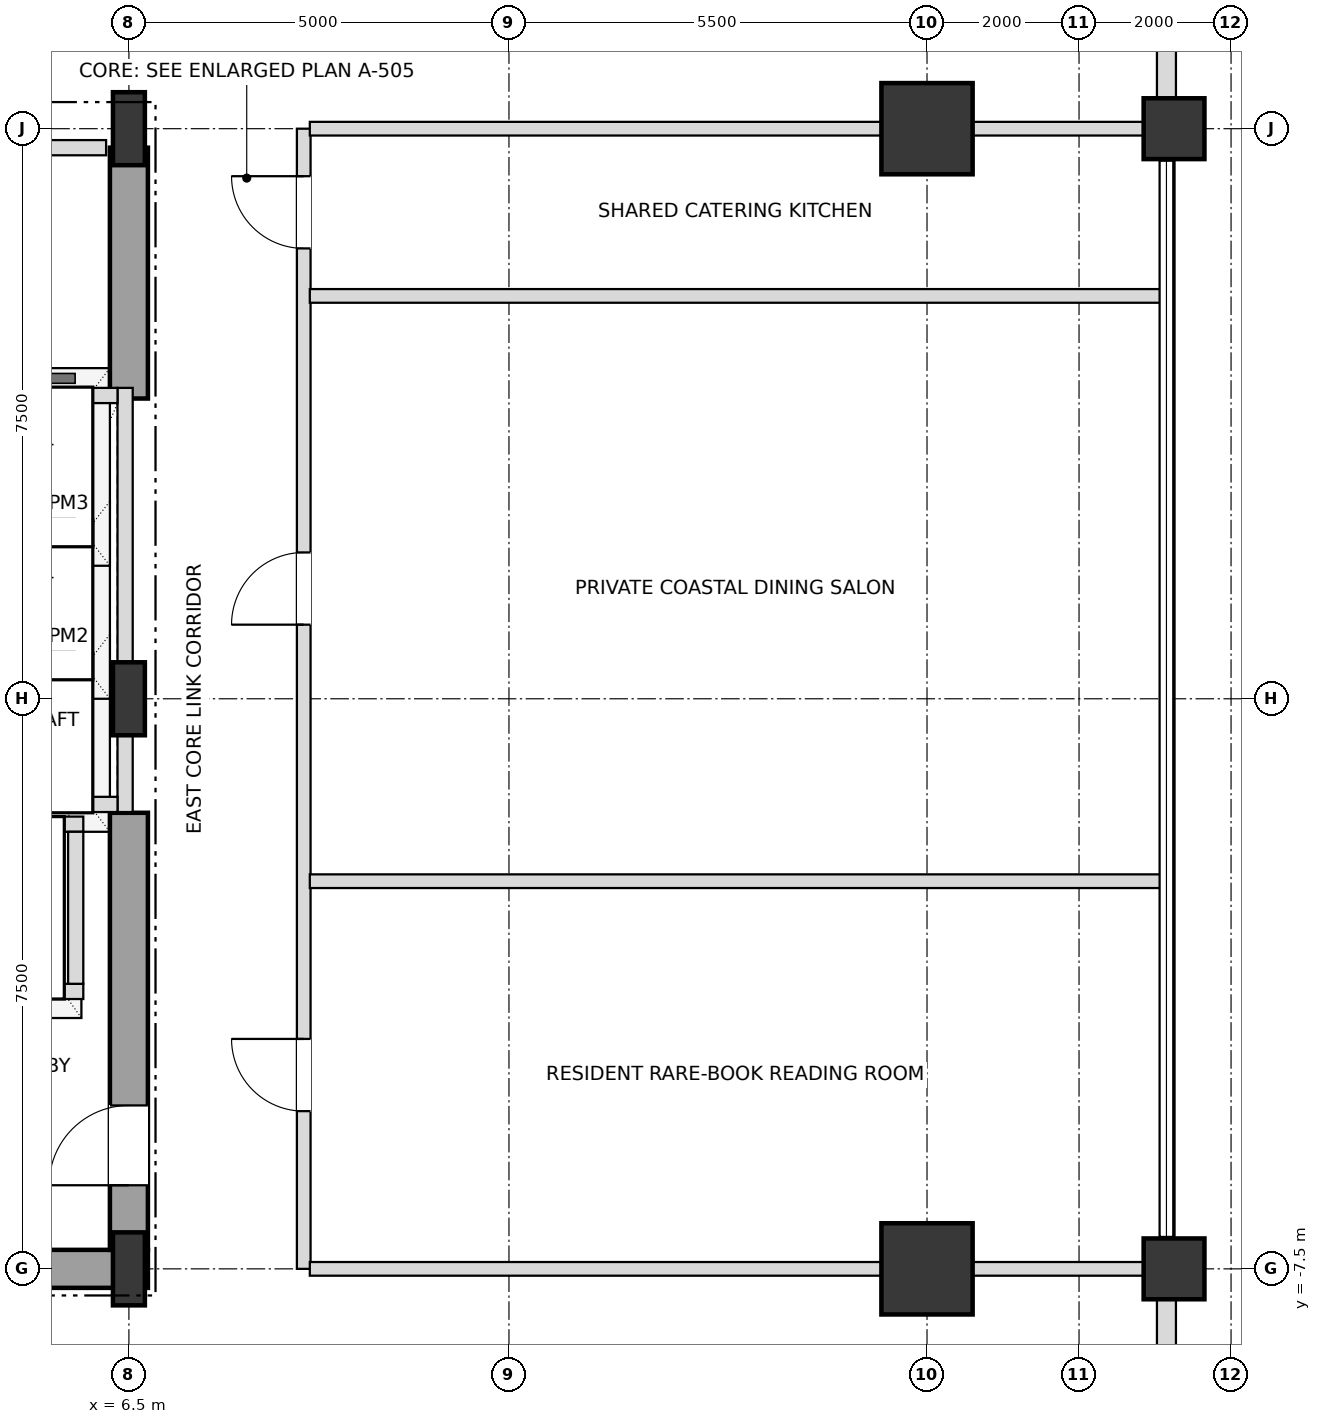
"""IFC4 building model, lengths in metres.
Left out: names, types, materials, properties, quantities, classifications, styles, units other than length and angle.
Written with IfcOpenShell. Run it as: python <this file> out.ifc"""

import sys

from ifc_helpers import new_model, si_unit, direction, frame, frame_2d, origin, origin_2d, place, context, subcontext, project, spatial, rectangle, i_section, extrude, element, fill, save


model = new_model("IFC4")
c1 = context("Model", 3, precision=1e-05, world=origin(), true_north=direction((0.0, 1.0)))
c2 = subcontext(c1, "Body", "Model", "MODEL_VIEW")
j1 = project(units=[si_unit("LENGTHUNIT", "METRE"), si_unit("PLANEANGLEUNIT", "RADIAN")], contexts=[c1])
p1 = place(None, origin())
s1 = spatial("IfcSite", under=j1, at=p1, CompositionType="ELEMENT")
p2 = place(p1, origin())
s2 = spatial("IfcBuilding", under=s1, at=p2, CompositionType="ELEMENT")
p3 = place(p2, frame((0.0, 0.0, 140.4)))
s3 = spatial("IfcBuildingStorey", under=s2, at=p3, CompositionType="ELEMENT", Elevation=140.4)
for number, where, z_axis, x_axis in (
    (1, (6.5, -7.5, 0.0), (0.0, 0.0, 1.0), (1.0, 0.0, 0.0)),
    (2, (6.5, 0.0, 0.0), (0.0, 0.0, 1.0), (1.0, 0.0, 0.0)),
    (3, (6.5, 7.5, 0.0), (0.0, 0.0, 1.0), (1.0, 0.0, 0.0)),
):
    element("IfcColumn", number, at=place(p3, frame(where, z_axis=z_axis, x_axis=x_axis)), inside=s3, PredefinedType="COLUMN", context=c2, shape_type="SweptSolid", body=[
        extrude(i_section(OverallWidth=0.42, OverallDepth=0.96, WebThickness=0.022, FlangeThickness=0.034, at=origin_2d()), origin(), (0.0, 0.0, 1.0), 3.6),
    ])
for number, where, z_axis, x_axis in (
    (4, (17.0, -7.5, 0.0), (0.0, 0.0, 1.0), (1.0, 0.0, 0.0)),
    (5, (17.0, 7.5, 0.0), (0.0, 0.0, 1.0), (1.0, 0.0, 0.0)),
):
    element("IfcColumn", number, at=place(p3, frame(where, z_axis=z_axis, x_axis=x_axis)), inside=s3, PredefinedType="USERDEFINED", context=c2, shape_type="SweptSolid", body=[
        extrude(rectangle(XDim=1.2, YDim=1.2, at=origin_2d()), origin(), (0.0, 0.0, 1.0), 3.6),
    ])
for number, where, z_axis, x_axis in (
    (6, (20.25, -7.5, 0.0), (0.0, 0.0, 1.0), (1.0, 0.0, 0.0)),
    (7, (20.25, 7.5, 0.0), (0.0, 0.0, 1.0), (1.0, 0.0, 0.0)),
):
    element("IfcColumn", number, at=place(p3, frame(where, z_axis=z_axis, x_axis=x_axis)), inside=s3, PredefinedType="COLUMN", context=c2, shape_type="SweptSolid", body=[
        extrude(rectangle(XDim=0.8, YDim=0.8, at=origin_2d()), origin(), (0.0, 0.0, 1.0), 3.6),
    ])
p4 = place(p3, frame((20.15, -12.605, 0.0), z_axis=(0.0, 0.0, 1.0), x_axis=(0.0, 1.0, 0.0)))
e8 = element("IfcWall", 8, at=p4, inside=s3, PredefinedType="SOLIDWALL", context=c2, shape_type="SweptSolid", body=[
    extrude(rectangle(XDim=4.71, YDim=0.25, at=frame_2d((2.355, 0.0))), origin(), (0.0, 0.0, 1.0), 2.736),
])
p5 = place(p4, frame((1.455, 0.0, 0.72)))
e9 = element("IfcOpeningElement", 9, at=p5, cuts=e8, PredefinedType="OPENING", context=c2, shape_type="SweptSolid", body=[
    extrude(rectangle(XDim=1.8, YDim=1.68, at=frame_2d((0.9, 0.84))), frame((0.0, 0.135, 0.0), z_axis=(0.0, -1.0, 0.0), x_axis=(1.0, 0.0, 0.0)), (0.0, 0.0, 1.0), 0.27),
])
p6 = place(p3, frame((20.15, 7.895, 0.0), z_axis=(0.0, 0.0, 1.0), x_axis=(0.0, 1.0, 0.0)))
e10 = element("IfcWall", 10, at=p6, inside=s3, PredefinedType="SOLIDWALL", context=c2, shape_type="SweptSolid", body=[
    extrude(rectangle(XDim=4.71, YDim=0.25, at=frame_2d((2.355, 0.0))), origin(), (0.0, 0.0, 1.0), 2.736),
])
p7 = place(p6, frame((1.455, 0.0, 0.72)))
e11 = element("IfcOpeningElement", 11, at=p7, cuts=e10, PredefinedType="OPENING", context=c2, shape_type="SweptSolid", body=[
    extrude(rectangle(XDim=1.8, YDim=1.68, at=frame_2d((0.9, 0.84))), frame((0.0, 0.135, 0.0), z_axis=(0.0, -1.0, 0.0), x_axis=(1.0, 0.0, 0.0)), (0.0, 0.0, 1.0), 0.27),
])
p8 = place(p3, frame((0.0, -7.5, 0.0), z_axis=(0.0, 0.0, 1.0), x_axis=(1.0, 0.0, 0.0)))
e12 = element("IfcWall", 12, at=p8, inside=s3, PredefinedType="SHEAR", context=c2, shape_type="SweptSolid", body=[
    extrude(rectangle(XDim=6.75, YDim=0.5, at=frame_2d((3.375, 0.0))), origin(), (0.0, 0.0, 1.0), 3.38),
])
p9 = place(p3, frame((6.5, -7.25, 0.0), z_axis=(0.0, 0.0, 1.0), x_axis=(0.0, 1.0, 0.0)))
e13 = element("IfcWall", 13, at=p9, inside=s3, PredefinedType="SHEAR", context=c2, shape_type="SweptSolid", body=[
    extrude(rectangle(XDim=5.75, YDim=0.5, at=frame_2d((2.875, 0.0))), origin(), (0.0, 0.0, 1.0), 3.38),
])
p10 = place(p9, frame((0.85, 0.0, 0.0)))
e14 = element("IfcOpeningElement", 14, at=p10, cuts=e13, PredefinedType="OPENING", context=c2, shape_type="SweptSolid", body=[
    extrude(rectangle(XDim=1.05, YDim=2.15, at=frame_2d((0.525, 1.075))), frame((0.0, 0.26, 0.0), z_axis=(0.0, -1.0, 0.0), x_axis=(1.0, 0.0, 0.0)), (0.0, 0.0, 1.0), 0.52),
])
p11 = place(p3, frame((6.5, 3.95, 0.0), z_axis=(0.0, 0.0, 1.0), x_axis=(0.0, 1.0, 0.0)))
e15 = element("IfcWall", 15, at=p11, inside=s3, PredefinedType="SHEAR", context=c2, shape_type="SweptSolid", body=[
    extrude(rectangle(XDim=3.3, YDim=0.5, at=frame_2d((1.65, 0.0))), origin(), (0.0, 0.0, 1.0), 3.38),
])
p12 = place(p3, frame((6.45, -1.49, 0.0), z_axis=(0.0, 0.0, 1.0), x_axis=(0.0, 1.0, 0.0)))
e16 = element("IfcWall", 16, at=p12, inside=s3, PredefinedType="SOLIDWALL", context=c2, shape_type="SweptSolid", body=[
    extrude(rectangle(XDim=5.58, YDim=0.2, at=frame_2d((2.79, 0.0))), origin(), (0.0, 0.0, 1.0), 2.816),
])
for number, where, z_axis, x_axis in (
    (17, (4.15, -1.39, 0.0), (0.0, 0.0, 1.0), (1.0, 0.0, 0.0)),
    (18, (4.15, 3.99, 0.0), (0.0, 0.0, 1.0), (1.0, 0.0, 0.0)),
):
    element("IfcWall", number, at=place(p3, frame(where, z_axis=z_axis, x_axis=x_axis)), inside=s3, PredefinedType="SOLIDWALL", context=c2, shape_type="SweptSolid", body=[
        extrude(rectangle(XDim=2.2, YDim=0.2, at=frame_2d((1.1, 0.0))), origin(), (0.0, 0.0, 1.0), 3.38),
    ])
p13 = place(p3, frame((1.8, -3.85, 0.0), z_axis=(0.0, 0.0, 1.0), x_axis=(1.0, 0.0, 0.0)))
e19 = element("IfcWall", 19, at=p13, inside=s3, PredefinedType="SOLIDWALL", context=c2, shape_type="SweptSolid", body=[
    extrude(rectangle(XDim=4.1, YDim=0.2, at=frame_2d((2.05, 0.0))), origin(), (0.0, 0.0, 1.0), 3.38),
])
p14 = place(p13, frame((0.45, 0.0, 0.0)))
e20 = element("IfcOpeningElement", 20, at=p14, cuts=e19, PredefinedType="OPENING", context=c2, shape_type="SweptSolid", body=[
    extrude(rectangle(XDim=1.2, YDim=2.2, at=frame_2d((0.6, 1.1))), frame((0.0, 0.11, 0.0), z_axis=(0.0, -1.0, 0.0), x_axis=(1.0, 0.0, 0.0)), (0.0, 0.0, 1.0), 0.22),
])
p15 = place(p13, frame((2.45, 0.0, 0.0)))
e21 = element("IfcOpeningElement", 21, at=p15, cuts=e19, PredefinedType="OPENING", context=c2, shape_type="SweptSolid", body=[
    extrude(rectangle(XDim=1.2, YDim=2.2, at=frame_2d((0.6, 1.1))), frame((0.0, 0.11, 0.0), z_axis=(0.0, -1.0, 0.0), x_axis=(1.0, 0.0, 0.0)), (0.0, 0.0, 1.0), 0.22),
])
p16 = place(p3, frame((1.8, -1.65, 0.0), z_axis=(0.0, 0.0, 1.0), x_axis=(1.0, 0.0, 0.0)))
e22 = element("IfcWall", 22, at=p16, inside=s3, PredefinedType="SOLIDWALL", context=c2, shape_type="SweptSolid", body=[
    extrude(rectangle(XDim=4.1, YDim=0.2, at=frame_2d((2.05, 0.0))), origin(), (0.0, 0.0, 1.0), 3.38),
])
p17 = place(p3, frame((5.8, -3.75, 0.0), z_axis=(0.0, 0.0, 1.0), x_axis=(0.0, 1.0, 0.0)))
e23 = element("IfcWall", 23, at=p17, inside=s3, PredefinedType="SOLIDWALL", context=c2, shape_type="SweptSolid", body=[
    extrude(rectangle(XDim=2.0, YDim=0.2, at=frame_2d((1.0, 0.0))), origin(), (0.0, 0.0, 1.0), 3.38),
])
p18 = place(p3, frame((8.8, -7.5, 0.0), z_axis=(0.0, 0.0, 1.0), x_axis=(0.0, 1.0, 0.0)))
e24 = element("IfcWall", 24, at=p18, inside=s3, PredefinedType="PARTITIONING", context=c2, shape_type="SweptSolid", body=[
    extrude(rectangle(XDim=15.0, YDim=0.18, at=frame_2d((7.5, 0.0))), origin(), (0.0, 0.0, 1.0), 3.38),
])
p19 = place(p18, frame((2.075, 0.0, 0.0)))
e25 = element("IfcOpeningElement", 25, at=p19, cuts=e24, PredefinedType="OPENING", context=c2, shape_type="SweptSolid", body=[
    extrude(rectangle(XDim=0.95, YDim=2.15, at=frame_2d((0.475, 1.075))), frame((0.0, 0.1, 0.0), z_axis=(0.0, -1.0, 0.0), x_axis=(1.0, 0.0, 0.0)), (0.0, 0.0, 1.0), 0.2),
])
p20 = place(p18, frame((8.475, 0.0, 0.0)))
e26 = element("IfcOpeningElement", 26, at=p20, cuts=e24, PredefinedType="OPENING", context=c2, shape_type="SweptSolid", body=[
    extrude(rectangle(XDim=0.95, YDim=2.15, at=frame_2d((0.475, 1.075))), frame((0.0, 0.1, 0.0), z_axis=(0.0, -1.0, 0.0), x_axis=(1.0, 0.0, 0.0)), (0.0, 0.0, 1.0), 0.2),
])
p21 = place(p18, frame((13.425, 0.0, 0.0)))
e27 = element("IfcOpeningElement", 27, at=p21, cuts=e24, PredefinedType="OPENING", context=c2, shape_type="SweptSolid", body=[
    extrude(rectangle(XDim=0.95, YDim=2.15, at=frame_2d((0.475, 1.075))), frame((0.0, 0.1, 0.0), z_axis=(0.0, -1.0, 0.0), x_axis=(1.0, 0.0, 0.0)), (0.0, 0.0, 1.0), 0.2),
])
p22 = place(p3, frame((8.88, -7.5, 0.0), z_axis=(0.0, 0.0, 1.0), x_axis=(1.0, 0.0, 0.0)))
e28 = element("IfcWall", 28, at=p22, inside=s3, PredefinedType="PARTITIONING", context=c2, shape_type="SweptSolid", body=[
    extrude(rectangle(XDim=11.27, YDim=0.18, at=frame_2d((5.635, 0.0))), origin(), (0.0, 0.0, 1.0), 2.816),
])
for number, where, z_axis, x_axis in (
    (29, (8.88, -2.4, 0.0), (0.0, 0.0, 1.0), (1.0, 0.0, 0.0)),
    (30, (8.88, 5.3, 0.0), (0.0, 0.0, 1.0), (1.0, 0.0, 0.0)),
):
    element("IfcWall", number, at=place(p3, frame(where, z_axis=z_axis, x_axis=x_axis)), inside=s3, PredefinedType="PARTITIONING", context=c2, shape_type="SweptSolid", body=[
        extrude(rectangle(XDim=11.19, YDim=0.18, at=frame_2d((5.595, 0.0))), origin(), (0.0, 0.0, 1.0), 2.816),
    ])
p23 = place(p3, frame((4.13, 7.25, 0.0), z_axis=(0.0, 0.0, 1.0), x_axis=(1.0, 0.0, 0.0)))
e31 = element("IfcWall", 31, at=p23, inside=s3, PredefinedType="SOLIDWALL", context=c2, shape_type="SweptSolid", body=[
    extrude(rectangle(XDim=2.07, YDim=0.2, at=frame_2d((1.035, 0.0))), origin(), (0.0, 0.0, 1.0), 3.38),
])
p24 = place(p3, frame((8.88, 7.5, 0.0), z_axis=(0.0, 0.0, 1.0), x_axis=(1.0, 0.0, 0.0)))
e32 = element("IfcWall", 32, at=p24, inside=s3, PredefinedType="PARTITIONING", context=c2, shape_type="SweptSolid", body=[
    extrude(rectangle(XDim=11.27, YDim=0.18, at=frame_2d((5.635, 0.0))), origin(), (0.0, 0.0, 1.0), 2.816),
])
p25 = place(p10, origin())
e33 = element("IfcDoor", 33, at=p25, inside=s3, OperationType="SINGLE_SWING_LEFT", PredefinedType="DOOR", context=c2, shape_type="SweptSolid", body=[
    extrude(rectangle(XDim=1.05, YDim=2.15, at=frame_2d((0.525, 1.075))), frame((0.0, 0.025, 0.0), z_axis=(0.0, -1.0, 0.0), x_axis=(1.0, 0.0, 0.0)), (0.0, 0.0, 1.0), 0.05),
])
fill(e14, e33)
p26 = place(p19, origin())
e34 = element("IfcDoor", 34, at=p26, inside=s3, OperationType="SINGLE_SWING_RIGHT", PredefinedType="DOOR", context=c2, shape_type="SweptSolid", body=[
    extrude(rectangle(XDim=0.95, YDim=2.15, at=frame_2d((0.475, 1.075))), frame((0.0, 0.025, 0.0), z_axis=(0.0, -1.0, 0.0), x_axis=(1.0, 0.0, 0.0)), (0.0, 0.0, 1.0), 0.05),
])
fill(e25, e34)
p27 = place(p20, origin())
e35 = element("IfcDoor", 35, at=p27, inside=s3, OperationType="SINGLE_SWING_LEFT", PredefinedType="DOOR", context=c2, shape_type="SweptSolid", body=[
    extrude(rectangle(XDim=0.95, YDim=2.15, at=frame_2d((0.475, 1.075))), frame((0.0, 0.025, 0.0), z_axis=(0.0, -1.0, 0.0), x_axis=(1.0, 0.0, 0.0)), (0.0, 0.0, 1.0), 0.05),
])
fill(e26, e35)
p28 = place(p21, origin())
e36 = element("IfcDoor", 36, at=p28, inside=s3, OperationType="SINGLE_SWING_RIGHT", PredefinedType="DOOR", context=c2, shape_type="SweptSolid", body=[
    extrude(rectangle(XDim=0.95, YDim=2.15, at=frame_2d((0.475, 1.075))), frame((0.0, 0.025, 0.0), z_axis=(0.0, -1.0, 0.0), x_axis=(1.0, 0.0, 0.0)), (0.0, 0.0, 1.0), 0.05),
])
fill(e27, e36)
save(model, sys.argv[1])
